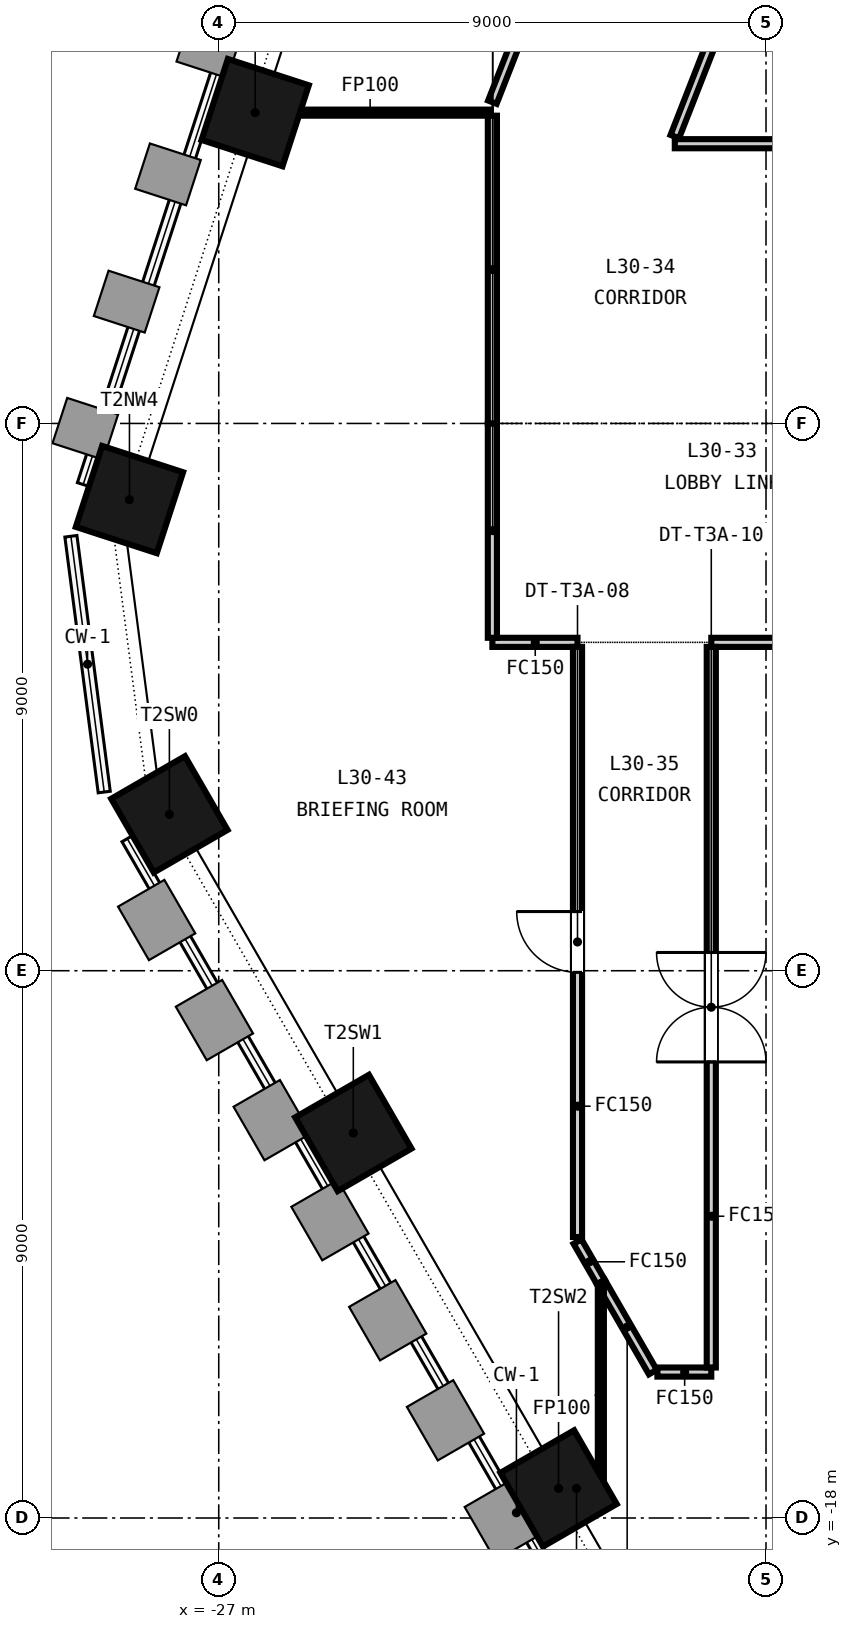
"""IFC4 building model, lengths in metres.
Left out: names, types, materials, properties, quantities, classifications, styles, units other than length and angle.
Written with IfcOpenShell. Run it as: python <this file> out.ifc"""

import sys

from ifc_helpers import new_model, si_unit, direction, frame, frame_2d, origin, origin_2d, place, context, subcontext, project, spatial, rectangle, extrude, element, fill, save


model = new_model("IFC4")
c1 = context("Model", 3, precision=1e-05, world=origin(), true_north=direction((0.0, 1.0)))
c2 = subcontext(c1, "Body", "Model", "MODEL_VIEW")
j1 = project(units=[si_unit("LENGTHUNIT", "METRE"), si_unit("PLANEANGLEUNIT", "RADIAN")], contexts=[c1])
p1 = place(None, origin())
s1 = spatial("IfcSite", under=j1, at=p1, CompositionType="ELEMENT")
p2 = place(p1, origin())
s2 = spatial("IfcBuilding", under=s1, at=p2, CompositionType="ELEMENT")
p3 = place(p2, frame((0.0, 0.0, 126.15)))
s3 = spatial("IfcBuildingStorey", under=s2, at=p3, CompositionType="ELEMENT", Elevation=126.15)
for number, where, z_axis, x_axis in (
    (1, (-26.401, 5.111, -0.15), (0.0, 0.0, 1.0), (-0.309, -0.951, 0.0)),
    (2, (-28.468, -1.252, -0.15), (0.0, 0.0, 1.0), (-0.309, -0.951, 0.0)),
    (3, (-27.812, -6.429, -0.15), (0.0, 0.0, 1.0), (0.5, -0.866, 0.0)),
    (4, (-24.787, -11.668, -0.15), (0.0, 0.0, 1.0), (0.5, -0.866, 0.0)),
    (5, (-21.412, -17.514, -0.15), (0.0, 0.0, 1.0), (0.5, -0.866, 0.0)),
):
    element("IfcColumn", number, at=place(p3, frame(where, z_axis=z_axis, x_axis=x_axis)), inside=s3, PredefinedType="COLUMN", context=c2, shape_type="SweptSolid", body=[
        extrude(rectangle(XDim=1.4, YDim=1.4, at=origin_2d()), origin(), (0.0, 0.0, 1.0), 3.65),
    ])
p4 = place(p3, frame((-21.1, -3.6, 0.0), z_axis=(0.0, 0.0, 1.0), x_axis=(-1.0, 0.0, 0.0)))
e6 = element("IfcWall", 6, at=p4, inside=s3, PredefinedType="PARTITIONING", context=c2, shape_type="SweptSolid", body=[
    extrude(rectangle(XDim=1.4, YDim=0.15, at=frame_2d((0.7, 0.0))), origin(), (0.0, 0.0, 1.0), 2.741),
])
p5 = place(p3, frame((-15.0, -3.6, 0.0), z_axis=(0.0, 0.0, 1.0), x_axis=(-1.0, 0.0, 0.0)))
e7 = element("IfcWall", 7, at=p5, inside=s3, PredefinedType="PARTITIONING", context=c2, shape_type="SweptSolid", body=[
    extrude(rectangle(XDim=3.9, YDim=0.15, at=frame_2d((1.95, 0.0))), origin(), (0.0, 0.0, 1.0), 2.741),
])
p6 = place(p3, frame((-15.476, 15.0, 0.0), z_axis=(0.0, 0.0, 1.0), x_axis=(-0.364411853206, -0.931237886494, 0.0)))
e8 = element("IfcWall", 8, at=p6, inside=s3, PredefinedType="PARTITIONING", context=c2, shape_type="SweptSolid", body=[
    extrude(rectangle(XDim=11.042, YDim=0.15, at=frame_2d((5.521, 0.0))), origin(), (0.0, 0.0, 1.0), 2.741),
])
p7 = place(p6, frame((5.021, 0.0, 0.0)))
e9 = element("IfcOpeningElement", 9, at=p7, cuts=e8, PredefinedType="OPENING", context=c2, shape_type="SweptSolid", body=[
    extrude(rectangle(XDim=1.0, YDim=2.1, at=frame_2d((0.5, 1.05))), frame((0.0, 0.085, 0.0), z_axis=(0.0, -1.0, 0.0), x_axis=(1.0, 0.0, 0.0)), (0.0, 0.0, 1.0), 0.17),
])
p8 = place(p3, frame((-20.716, -14.119, 0.0), z_axis=(0.0, 0.0, 1.0), x_axis=(-0.500208722528, 0.865904864236, 0.0)))
e10 = element("IfcWall", 10, at=p8, inside=s3, PredefinedType="PARTITIONING", context=c2, shape_type="SweptSolid", body=[
    extrude(rectangle(XDim=0.768, YDim=0.15, at=frame_2d((0.384, 0.0))), origin(), (0.0, 0.0, 1.0), 2.741),
])
p9 = place(p3, frame((-19.861, -15.6, 0.0), z_axis=(0.0, 0.0, 1.0), x_axis=(-0.499916050814, 0.866073866445, 0.0)))
e11 = element("IfcWall", 11, at=p9, inside=s3, PredefinedType="PARTITIONING", context=c2, shape_type="SweptSolid", body=[
    extrude(rectangle(XDim=1.71, YDim=0.15, at=frame_2d((0.855, 0.0))), origin(), (0.0, 0.0, 1.0), 2.741),
])
p10 = place(p3, frame((-18.9, -15.6, 0.0), z_axis=(0.0, 0.0, 1.0), x_axis=(-1.0, 0.0, 0.0)))
e12 = element("IfcWall", 12, at=p10, inside=s3, PredefinedType="PARTITIONING", context=c2, shape_type="SweptSolid", body=[
    extrude(rectangle(XDim=0.886, YDim=0.15, at=frame_2d((0.443, 0.0))), origin(), (0.0, 0.0, 1.0), 2.741),
])
p11 = place(p3, frame((-18.9, -3.675, 0.0), z_axis=(0.0, 0.0, 1.0), x_axis=(0.0, -1.0, 0.0)))
e13 = element("IfcWall", 13, at=p11, inside=s3, PredefinedType="PARTITIONING", context=c2, shape_type="SweptSolid", body=[
    extrude(rectangle(XDim=11.85, YDim=0.15, at=frame_2d((5.925, 0.0))), origin(), (0.0, 0.0, 1.0), 2.741),
])
p12 = place(p11, frame((5.025, 0.0, 0.0)))
e14 = element("IfcOpeningElement", 14, at=p12, cuts=e13, PredefinedType="OPENING", context=c2, shape_type="SweptSolid", body=[
    extrude(rectangle(XDim=1.8, YDim=2.1, at=frame_2d((0.9, 1.05))), frame((0.0, 0.085, 0.0), z_axis=(0.0, -1.0, 0.0), x_axis=(1.0, 0.0, 0.0)), (0.0, 0.0, 1.0), 0.17),
])
p13 = place(p3, frame((-22.5, 5.283, 0.0), z_axis=(0.0, 0.0, 1.0), x_axis=(0.364389237236, 0.931246736256, 0.0)))
e15 = element("IfcWall", 15, at=p13, inside=s3, PredefinedType="PARTITIONING", context=c2, shape_type="SweptSolid", body=[
    extrude(rectangle(XDim=13.656, YDim=0.15, at=frame_2d((6.828, 0.0))), origin(), (0.0, 0.0, 1.0), 2.741),
])
p14 = place(p13, frame((6.328, 0.0, 0.0)))
e16 = element("IfcOpeningElement", 16, at=p14, cuts=e15, PredefinedType="OPENING", context=c2, shape_type="SweptSolid", body=[
    extrude(rectangle(XDim=1.0, YDim=2.1, at=frame_2d((0.5, 1.05))), frame((0.0, 0.085, 0.0), z_axis=(0.0, -1.0, 0.0), x_axis=(1.0, 0.0, 0.0)), (0.0, 0.0, 1.0), 0.17),
])
p15 = place(p3, frame((-26.506, 5.111, 0.0), z_axis=(0.0, 0.0, 1.0), x_axis=(1.0, 0.0, 0.0)))
e17 = element("IfcWall", 17, at=p15, inside=s3, PredefinedType="PARTITIONING", context=c2, shape_type="SweptSolid", body=[
    extrude(rectangle(XDim=3.981, YDim=0.1, at=frame_2d((1.991, 0.0))), origin(), (0.0, 0.0, 1.0), 2.741),
])
p16 = place(p3, frame((-19.5, 4.6, 0.0), z_axis=(0.0, 0.0, 1.0), x_axis=(1.0, 0.0, 0.0)))
e18 = element("IfcWall", 18, at=p16, inside=s3, PredefinedType="PARTITIONING", context=c2, shape_type="SweptSolid", body=[
    extrude(rectangle(XDim=4.5, YDim=0.15, at=frame_2d((2.25, 0.0))), origin(), (0.0, 0.0, 1.0), 2.741),
])
p17 = place(p3, frame((-22.5, -3.525, 0.0), z_axis=(0.0, 0.0, 1.0), x_axis=(0.0, 1.0, 0.0)))
e19 = element("IfcWall", 19, at=p17, inside=s3, PredefinedType="PARTITIONING", context=c2, shape_type="SweptSolid", body=[
    extrude(rectangle(XDim=3.525, YDim=0.15, at=frame_2d((1.762, 0.0))), origin(), (0.0, 0.0, 1.0), 2.741),
])
p18 = place(p3, frame((-22.5, 0.0, 0.0), z_axis=(0.0, 0.0, 1.0), x_axis=(0.0, 1.0, 0.0)))
e20 = element("IfcWall", 20, at=p18, inside=s3, PredefinedType="PARTITIONING", context=c2, shape_type="SweptSolid", body=[
    extrude(rectangle(XDim=5.061, YDim=0.15, at=frame_2d((2.531, 0.0))), origin(), (0.0, 0.0, 1.0), 2.741),
])
p19 = place(p3, frame((-21.1, -13.379, 0.0), z_axis=(0.0, 0.0, 1.0), x_axis=(0.0, 1.0, 0.0)))
e21 = element("IfcWall", 21, at=p19, inside=s3, PredefinedType="PARTITIONING", context=c2, shape_type="SweptSolid", body=[
    extrude(rectangle(XDim=9.704, YDim=0.15, at=frame_2d((4.852, 0.0))), origin(), (0.0, 0.0, 1.0), 2.741),
])
p20 = place(p19, frame((4.352, 0.0, 0.0)))
e22 = element("IfcOpeningElement", 22, at=p20, cuts=e21, PredefinedType="OPENING", context=c2, shape_type="SweptSolid", body=[
    extrude(rectangle(XDim=1.0, YDim=2.1, at=frame_2d((0.5, 1.05))), frame((0.0, 0.085, 0.0), z_axis=(0.0, -1.0, 0.0), x_axis=(1.0, 0.0, 0.0)), (0.0, 0.0, 1.0), 0.17),
])
p21 = place(p3, frame((-21.527, -17.514, 0.0), z_axis=(0.0, 0.0, 1.0), x_axis=(1.0, 0.0, 0.0)))
e23 = element("IfcWall", 23, at=p21, inside=s3, PredefinedType="PARTITIONING", context=c2, shape_type="SweptSolid", body=[
    extrude(rectangle(XDim=0.811, YDim=0.1, at=frame_2d((0.406, 0.0))), origin(), (0.0, 0.0, 1.0), 2.741),
])
p22 = place(p3, frame((-20.716, -17.464, 0.0), z_axis=(0.0, 0.0, 1.0), x_axis=(0.0, 1.0, 0.0)))
e24 = element("IfcWall", 24, at=p22, inside=s3, PredefinedType="PARTITIONING", context=c2, shape_type="SweptSolid", body=[
    extrude(rectangle(XDim=3.27, YDim=0.1, at=frame_2d((1.635, 0.0))), origin(), (0.0, 0.0, 1.0), 2.741),
])
p23 = place(p20, origin())
e25 = element("IfcDoor", 25, at=p23, inside=s3, OperationType="SINGLE_SWING_RIGHT", PredefinedType="DOOR", context=c2, shape_type="SweptSolid", body=[
    extrude(rectangle(XDim=1.0, YDim=2.1, at=frame_2d((0.5, 1.05))), frame((0.0, 0.025, 0.0), z_axis=(0.0, -1.0, 0.0), x_axis=(1.0, 0.0, 0.0)), (0.0, 0.0, 1.0), 0.05),
])
fill(e22, e25)
p24 = place(p12, origin())
e26 = element("IfcDoor", 26, at=p24, inside=s3, OperationType="DOUBLE_DOOR_DOUBLE_SWING", PredefinedType="DOOR", context=c2, shape_type="SweptSolid", body=[
    extrude(rectangle(XDim=1.8, YDim=2.1, at=frame_2d((0.9, 1.05))), frame((0.0, 0.025, 0.0), z_axis=(0.0, -1.0, 0.0), x_axis=(1.0, 0.0, 0.0)), (0.0, 0.0, 1.0), 0.05),
])
fill(e14, e26)
save(model, sys.argv[1])
